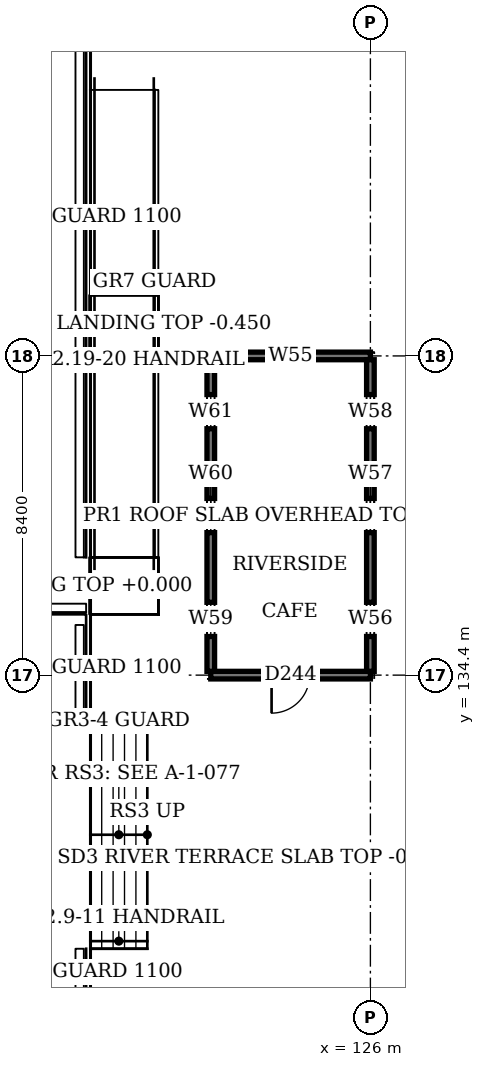
"""IFC4 building model, lengths in metres.
Left out: names, types, materials, properties, quantities, classifications, styles, units other than length and angle.
Written with IfcOpenShell. Run it as: python <this file> out.ifc"""

import sys

from ifc_helpers import new_model, si_unit, direction, frame, frame_2d, origin, place, context, subcontext, project, spatial, rectangle, extrude, element, fill, save


model = new_model("IFC4")
c1 = context("Model", 3, precision=1e-05, world=origin(), true_north=direction((0.0, 1.0)))
c2 = subcontext(c1, "Body", "Model", "MODEL_VIEW")
j1 = project(units=[si_unit("LENGTHUNIT", "METRE"), si_unit("PLANEANGLEUNIT", "RADIAN")], contexts=[c1])
p1 = place(None, origin())
s1 = spatial("IfcSite", under=j1, at=p1, CompositionType="ELEMENT")
p2 = place(p1, origin())
s2 = spatial("IfcBuilding", under=s1, at=p2, CompositionType="ELEMENT")
p3 = place(p2, origin())
s3 = spatial("IfcBuildingStorey", under=s2, at=p3, CompositionType="ELEMENT", Elevation=0.0)
p4 = place(p3, frame((121.8, 134.4, -0.9), z_axis=(0.0, 0.0, 1.0), x_axis=(1.0, 0.0, 0.0)))
e1 = element("IfcWall", 1, at=p4, inside=s3, PredefinedType="SOLIDWALL", context=c2, shape_type="SweptSolid", body=[
    extrude(rectangle(XDim=4.2, YDim=0.2, at=frame_2d((2.1, 0.0))), origin(), (0.0, 0.0, 1.0), 3.0),
])
p5 = place(p4, frame((1.6, 0.0, 0.0)))
e2 = element("IfcOpeningElement", 2, at=p5, cuts=e1, PredefinedType="OPENING", context=c2, shape_type="SweptSolid", body=[
    extrude(rectangle(XDim=1.0, YDim=2.4, at=frame_2d((0.5, 1.2))), frame((0.0, 0.11, 0.0), z_axis=(0.0, -1.0, 0.0), x_axis=(1.0, 0.0, 0.0)), (0.0, 0.0, 1.0), 0.22),
])
p6 = place(p3, frame((121.8, 142.8, -0.9), z_axis=(0.0, 0.0, 1.0), x_axis=(1.0, 0.0, 0.0)))
e3 = element("IfcWall", 3, at=p6, inside=s3, PredefinedType="SOLIDWALL", context=c2, shape_type="SweptSolid", body=[
    extrude(rectangle(XDim=4.2, YDim=0.2, at=frame_2d((2.1, 0.0))), origin(), (0.0, 0.0, 1.0), 3.0),
])
p7 = place(p6, frame((1.65, 0.0, 0.9)))
e4 = element("IfcOpeningElement", 4, at=p7, cuts=e3, PredefinedType="OPENING", context=c2, shape_type="SweptSolid", body=[
    extrude(rectangle(XDim=0.9, YDim=1.2, at=frame_2d((0.45, 0.6))), frame((0.0, 0.11, 0.0), z_axis=(0.0, -1.0, 0.0), x_axis=(1.0, 0.0, 0.0)), (0.0, 0.0, 1.0), 0.22),
])
p8 = place(p3, frame((121.8, 134.5, -0.9), z_axis=(0.0, 0.0, 1.0), x_axis=(0.0, 1.0, 0.0)))
e5 = element("IfcWall", 5, at=p8, inside=s3, PredefinedType="SOLIDWALL", context=c2, shape_type="SweptSolid", body=[
    extrude(rectangle(XDim=8.2, YDim=0.2, at=frame_2d((4.1, 0.0))), origin(), (0.0, 0.0, 1.0), 3.0),
])
p9 = place(p8, frame((0.917, 0.0, 0.9)))
e6 = element("IfcOpeningElement", 6, at=p9, cuts=e5, PredefinedType="OPENING", context=c2, shape_type="SweptSolid", body=[
    extrude(rectangle(XDim=0.9, YDim=1.2, at=frame_2d((0.45, 0.6))), frame((0.0, 0.11, 0.0), z_axis=(0.0, -1.0, 0.0), x_axis=(1.0, 0.0, 0.0)), (0.0, 0.0, 1.0), 0.22),
])
p10 = place(p8, frame((3.65, 0.0, 0.9)))
e7 = element("IfcOpeningElement", 7, at=p10, cuts=e5, PredefinedType="OPENING", context=c2, shape_type="SweptSolid", body=[
    extrude(rectangle(XDim=0.9, YDim=1.2, at=frame_2d((0.45, 0.6))), frame((0.0, 0.11, 0.0), z_axis=(0.0, -1.0, 0.0), x_axis=(1.0, 0.0, 0.0)), (0.0, 0.0, 1.0), 0.22),
])
p11 = place(p8, frame((6.383, 0.0, 0.9)))
e8 = element("IfcOpeningElement", 8, at=p11, cuts=e5, PredefinedType="OPENING", context=c2, shape_type="SweptSolid", body=[
    extrude(rectangle(XDim=0.9, YDim=1.2, at=frame_2d((0.45, 0.6))), frame((0.0, 0.11, 0.0), z_axis=(0.0, -1.0, 0.0), x_axis=(1.0, 0.0, 0.0)), (0.0, 0.0, 1.0), 0.22),
])
p12 = place(p3, frame((126.0, 134.5, -0.9), z_axis=(0.0, 0.0, 1.0), x_axis=(0.0, 1.0, 0.0)))
e9 = element("IfcWall", 9, at=p12, inside=s3, PredefinedType="SOLIDWALL", context=c2, shape_type="SweptSolid", body=[
    extrude(rectangle(XDim=8.2, YDim=0.2, at=frame_2d((4.1, 0.0))), origin(), (0.0, 0.0, 1.0), 3.0),
])
p13 = place(p12, frame((0.917, 0.0, 0.9)))
e10 = element("IfcOpeningElement", 10, at=p13, cuts=e9, PredefinedType="OPENING", context=c2, shape_type="SweptSolid", body=[
    extrude(rectangle(XDim=0.9, YDim=1.2, at=frame_2d((0.45, 0.6))), frame((0.0, 0.11, 0.0), z_axis=(0.0, -1.0, 0.0), x_axis=(1.0, 0.0, 0.0)), (0.0, 0.0, 1.0), 0.22),
])
p14 = place(p12, frame((3.65, 0.0, 0.9)))
e11 = element("IfcOpeningElement", 11, at=p14, cuts=e9, PredefinedType="OPENING", context=c2, shape_type="SweptSolid", body=[
    extrude(rectangle(XDim=0.9, YDim=1.2, at=frame_2d((0.45, 0.6))), frame((0.0, 0.11, 0.0), z_axis=(0.0, -1.0, 0.0), x_axis=(1.0, 0.0, 0.0)), (0.0, 0.0, 1.0), 0.22),
])
p15 = place(p12, frame((6.383, 0.0, 0.9)))
e12 = element("IfcOpeningElement", 12, at=p15, cuts=e9, PredefinedType="OPENING", context=c2, shape_type="SweptSolid", body=[
    extrude(rectangle(XDim=0.9, YDim=1.2, at=frame_2d((0.45, 0.6))), frame((0.0, 0.11, 0.0), z_axis=(0.0, -1.0, 0.0), x_axis=(1.0, 0.0, 0.0)), (0.0, 0.0, 1.0), 0.22),
])
p16 = place(p5, frame((1.0, 0.0, 0.0), z_axis=(0.0, 0.0, 1.0), x_axis=(-1.0, 0.0, 0.0)))
e13 = element("IfcDoor", 13, at=p16, inside=s3, OperationType="SINGLE_SWING_RIGHT", PredefinedType="DOOR", context=c2, shape_type="SweptSolid", body=[
    extrude(rectangle(XDim=1.0, YDim=2.4, at=frame_2d((0.5, 1.2))), frame((0.0, 0.025, 0.0), z_axis=(0.0, -1.0, 0.0), x_axis=(1.0, 0.0, 0.0)), (0.0, 0.0, 1.0), 0.05),
])
fill(e2, e13)
p17 = place(p7, origin())
e14 = element("IfcWindow", 14, at=p17, inside=s3, PartitioningType="SINGLE_PANEL", PredefinedType="WINDOW", context=c2, shape_type="SweptSolid", body=[
    extrude(rectangle(XDim=0.9, YDim=1.2, at=frame_2d((0.45, 0.6))), frame((0.0, 0.03, 0.0), z_axis=(0.0, -1.0, 0.0), x_axis=(1.0, 0.0, 0.0)), (0.0, 0.0, 1.0), 0.06),
])
fill(e4, e14)
p18 = place(p13, origin())
e15 = element("IfcWindow", 15, at=p18, inside=s3, PartitioningType="SINGLE_PANEL", PredefinedType="WINDOW", context=c2, shape_type="SweptSolid", body=[
    extrude(rectangle(XDim=0.9, YDim=1.2, at=frame_2d((0.45, 0.6))), frame((0.0, 0.03, 0.0), z_axis=(0.0, -1.0, 0.0), x_axis=(1.0, 0.0, 0.0)), (0.0, 0.0, 1.0), 0.06),
])
fill(e10, e15)
p19 = place(p14, origin())
e16 = element("IfcWindow", 16, at=p19, inside=s3, PartitioningType="SINGLE_PANEL", PredefinedType="WINDOW", context=c2, shape_type="SweptSolid", body=[
    extrude(rectangle(XDim=0.9, YDim=1.2, at=frame_2d((0.45, 0.6))), frame((0.0, 0.03, 0.0), z_axis=(0.0, -1.0, 0.0), x_axis=(1.0, 0.0, 0.0)), (0.0, 0.0, 1.0), 0.06),
])
fill(e11, e16)
p20 = place(p15, origin())
e17 = element("IfcWindow", 17, at=p20, inside=s3, PartitioningType="SINGLE_PANEL", PredefinedType="WINDOW", context=c2, shape_type="SweptSolid", body=[
    extrude(rectangle(XDim=0.9, YDim=1.2, at=frame_2d((0.45, 0.6))), frame((0.0, 0.03, 0.0), z_axis=(0.0, -1.0, 0.0), x_axis=(1.0, 0.0, 0.0)), (0.0, 0.0, 1.0), 0.06),
])
fill(e12, e17)
p21 = place(p9, origin())
e18 = element("IfcWindow", 18, at=p21, inside=s3, PartitioningType="SINGLE_PANEL", PredefinedType="WINDOW", context=c2, shape_type="SweptSolid", body=[
    extrude(rectangle(XDim=0.9, YDim=1.2, at=frame_2d((0.45, 0.6))), frame((0.0, 0.03, 0.0), z_axis=(0.0, -1.0, 0.0), x_axis=(1.0, 0.0, 0.0)), (0.0, 0.0, 1.0), 0.06),
])
fill(e6, e18)
p22 = place(p10, origin())
e19 = element("IfcWindow", 19, at=p22, inside=s3, PartitioningType="SINGLE_PANEL", PredefinedType="WINDOW", context=c2, shape_type="SweptSolid", body=[
    extrude(rectangle(XDim=0.9, YDim=1.2, at=frame_2d((0.45, 0.6))), frame((0.0, 0.03, 0.0), z_axis=(0.0, -1.0, 0.0), x_axis=(1.0, 0.0, 0.0)), (0.0, 0.0, 1.0), 0.06),
])
fill(e7, e19)
p23 = place(p11, origin())
e20 = element("IfcWindow", 20, at=p23, inside=s3, PartitioningType="SINGLE_PANEL", PredefinedType="WINDOW", context=c2, shape_type="SweptSolid", body=[
    extrude(rectangle(XDim=0.9, YDim=1.2, at=frame_2d((0.45, 0.6))), frame((0.0, 0.03, 0.0), z_axis=(0.0, -1.0, 0.0), x_axis=(1.0, 0.0, 0.0)), (0.0, 0.0, 1.0), 0.06),
])
fill(e8, e20)
save(model, sys.argv[1])
